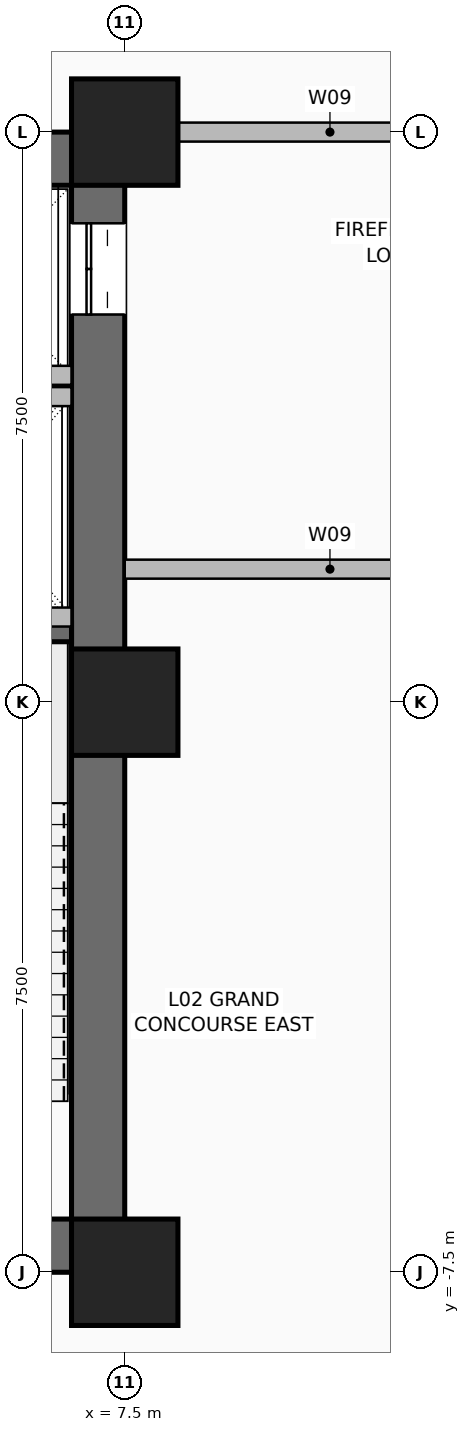
"""IFC4 building model, lengths in metres.
Left out: names, types, materials, properties, quantities, classifications, styles, units other than length and angle.
Written with IfcOpenShell. Run it as: python <this file> out.ifc"""

import sys

from ifc_helpers import new_model, si_unit, direction, frame, frame_2d, origin, origin_2d, place, context, subcontext, project, spatial, rectangle, hollow_rectangle, extrude, element, fill, save


model = new_model("IFC4")
c1 = context("Model", 3, precision=1e-05, world=origin(), true_north=direction((0.0, 1.0)))
c2 = subcontext(c1, "Body", "Model", "MODEL_VIEW")
j1 = project(units=[si_unit("LENGTHUNIT", "METRE"), si_unit("PLANEANGLEUNIT", "RADIAN")], contexts=[c1])
p1 = place(None, origin())
s1 = spatial("IfcSite", under=j1, at=p1, CompositionType="ELEMENT")
p2 = place(p1, origin())
s2 = spatial("IfcBuilding", under=s1, at=p2, CompositionType="ELEMENT")
p3 = place(p2, frame((0.0, 0.0, 10.8)))
s3 = spatial("IfcBuildingStorey", under=s2, at=p3, CompositionType="ELEMENT", Elevation=10.8)
for number, where, z_axis, x_axis in (
    (1, (7.5, -7.5, 0.0), (0.0, 0.0, 1.0), (1.0, 0.0, 0.0)),
    (2, (7.5, 0.0, 0.0), (0.0, 0.0, 1.0), (1.0, 0.0, 0.0)),
    (3, (7.5, 7.5, 0.0), (0.0, 0.0, 1.0), (1.0, 0.0, 0.0)),
):
    element("IfcColumn", number, at=place(p3, frame(where, z_axis=z_axis, x_axis=x_axis)), inside=s3, PredefinedType="COLUMN", context=c2, shape_type="SweptSolid", body=[
        extrude(hollow_rectangle(XDim=1.4, YDim=1.4, WallThickness=0.06, at=origin_2d()), origin(), (0.0, 0.0, 1.0), 5.4),
    ])
p4 = place(p3, frame((-7.5, -7.15, 0.0), z_axis=(0.0, 0.0, 1.0), x_axis=(1.0, 0.0, 0.0)))
e4 = element("IfcWall", 4, at=p4, inside=s3, PredefinedType="SHEAR", context=c2, shape_type="SweptSolid", body=[
    extrude(rectangle(XDim=15.0, YDim=0.7, at=frame_2d((7.5, 0.0))), origin(), (0.0, 0.0, 1.0), 5.0),
])
p5 = place(p4, frame((1.55, 0.0, 0.0)))
e5 = element("IfcOpeningElement", 5, at=p5, cuts=e4, PredefinedType="OPENING", context=c2, shape_type="SweptSolid", body=[
    extrude(rectangle(XDim=1.05, YDim=2.08, at=frame_2d((0.525, 1.04))), frame((0.0, 0.36, 0.0), z_axis=(0.0, -1.0, 0.0), x_axis=(1.0, 0.0, 0.0)), (0.0, 0.0, 1.0), 0.72),
])
p6 = place(p4, frame((12.4, 0.0, 0.0)))
e6 = element("IfcOpeningElement", 6, at=p6, cuts=e4, PredefinedType="OPENING", context=c2, shape_type="SweptSolid", body=[
    extrude(rectangle(XDim=1.05, YDim=2.08, at=frame_2d((0.525, 1.04))), frame((0.0, 0.36, 0.0), z_axis=(0.0, -1.0, 0.0), x_axis=(1.0, 0.0, 0.0)), (0.0, 0.0, 1.0), 0.72),
])
p7 = place(p4, frame((4.64, 0.0, 0.0)))
e7 = element("IfcOpeningElement", 7, at=p7, cuts=e4, PredefinedType="OPENING", context=c2, shape_type="SweptSolid", body=[
    extrude(rectangle(XDim=1.1, YDim=2.2, at=frame_2d((0.55, 1.1))), frame((0.0, 0.36, 0.0), z_axis=(0.0, -1.0, 0.0), x_axis=(1.0, 0.0, 0.0)), (0.0, 0.0, 1.0), 0.72),
])
p8 = place(p4, frame((6.52, 0.0, 0.0)))
e8 = element("IfcOpeningElement", 8, at=p8, cuts=e4, PredefinedType="OPENING", context=c2, shape_type="SweptSolid", body=[
    extrude(rectangle(XDim=1.1, YDim=2.2, at=frame_2d((0.55, 1.1))), frame((0.0, 0.36, 0.0), z_axis=(0.0, -1.0, 0.0), x_axis=(1.0, 0.0, 0.0)), (0.0, 0.0, 1.0), 0.72),
])
p9 = place(p4, frame((8.4, 0.0, 0.0)))
e9 = element("IfcOpeningElement", 9, at=p9, cuts=e4, PredefinedType="OPENING", context=c2, shape_type="SweptSolid", body=[
    extrude(rectangle(XDim=1.1, YDim=2.2, at=frame_2d((0.55, 1.1))), frame((0.0, 0.36, 0.0), z_axis=(0.0, -1.0, 0.0), x_axis=(1.0, 0.0, 0.0)), (0.0, 0.0, 1.0), 0.72),
])
p10 = place(p3, frame((-7.5, 7.15, 0.0), z_axis=(0.0, 0.0, 1.0), x_axis=(1.0, 0.0, 0.0)))
e10 = element("IfcWall", 10, at=p10, inside=s3, PredefinedType="SHEAR", context=c2, shape_type="SweptSolid", body=[
    extrude(rectangle(XDim=15.0, YDim=0.7, at=frame_2d((7.5, 0.0))), origin(), (0.0, 0.0, 1.0), 5.0),
])
p11 = place(p3, frame((7.15, -7.5, 0.0), z_axis=(0.0, 0.0, 1.0), x_axis=(0.0, 1.0, 0.0)))
e11 = element("IfcWall", 11, at=p11, inside=s3, PredefinedType="SHEAR", context=c2, shape_type="SweptSolid", body=[
    extrude(rectangle(XDim=15.0, YDim=0.7, at=frame_2d((7.5, 0.0))), origin(), (0.0, 0.0, 1.0), 5.0),
])
p12 = place(p11, frame((12.6, 0.0, 0.0)))
e12 = element("IfcOpeningElement", 12, at=p12, cuts=e11, PredefinedType="OPENING", context=c2, shape_type="SweptSolid", body=[
    extrude(rectangle(XDim=1.2, YDim=2.2, at=frame_2d((0.6, 1.1))), frame((0.0, 0.36, 0.0), z_axis=(0.0, -1.0, 0.0), x_axis=(1.0, 0.0, 0.0)), (0.0, 0.0, 1.0), 0.72),
])
p13 = place(p3, frame((3.47, 0.92, 0.0), z_axis=(0.0, 0.0, 1.0), x_axis=(1.0, 0.0, 0.0)))
e13 = element("IfcWall", 13, at=p13, inside=s3, PredefinedType="SHEAR", context=c2, shape_type="SweptSolid", body=[
    extrude(rectangle(XDim=3.33, YDim=0.25, at=frame_2d((1.665, 0.0))), origin(), (0.0, 0.0, 1.0), 5.0),
])
p14 = place(p3, frame((4.38, 4.3, 0.0), z_axis=(0.0, 0.0, 1.0), x_axis=(1.0, 0.0, 0.0)))
e14 = element("IfcWall", 14, at=p14, inside=s3, PredefinedType="SHEAR", context=c2, shape_type="SweptSolid", body=[
    extrude(rectangle(XDim=2.42, YDim=0.25, at=frame_2d((1.21, 0.0))), origin(), (0.0, 0.0, 1.0), 5.0),
])
for number, where, z_axis, x_axis in (
    (15, (4.28, 1.12, 0.0), (0.0, 0.0, 1.0), (1.0, 0.0, 0.0)),
    (16, (4.28, 4.02, 0.0), (0.0, 0.0, 1.0), (1.0, 0.0, 0.0)),
):
    element("IfcWall", number, at=place(p3, frame(where, z_axis=z_axis, x_axis=x_axis)), inside=s3, PredefinedType="SHEAR", context=c2, shape_type="SweptSolid", body=[
        extrude(rectangle(XDim=2.52, YDim=0.25, at=frame_2d((1.26, 0.0))), origin(), (0.0, 0.0, 1.0), 5.0),
    ])
for number, where, z_axis, x_axis in (
    (17, (7.5, 1.75, 0.0), (0.0, 0.0, 1.0), (1.0, 0.0, 0.0)),
    (18, (7.5, 7.5, 0.0), (0.0, 0.0, 1.0), (1.0, 0.0, 0.0)),
):
    element("IfcWall", number, at=place(p3, frame(where, z_axis=z_axis, x_axis=x_axis)), inside=s3, PredefinedType="SHEAR", context=c2, shape_type="SweptSolid", body=[
        extrude(rectangle(XDim=5.4, YDim=0.25, at=frame_2d((2.7, 0.0))), origin(), (0.0, 0.0, 1.0), 5.0),
    ])
p15 = place(p12, origin())
e19 = element("IfcDoor", 19, at=p15, inside=s3, OperationType="DOUBLE_DOOR_SLIDING", PredefinedType="DOOR", context=c2, shape_type="SweptSolid", body=[
    extrude(rectangle(XDim=1.2, YDim=2.2, at=frame_2d((0.6, 1.1))), frame((0.0, 0.025, 0.0), z_axis=(0.0, -1.0, 0.0), x_axis=(1.0, 0.0, 0.0)), (0.0, 0.0, 1.0), 0.05),
])
fill(e12, e19)
save(model, sys.argv[1])
